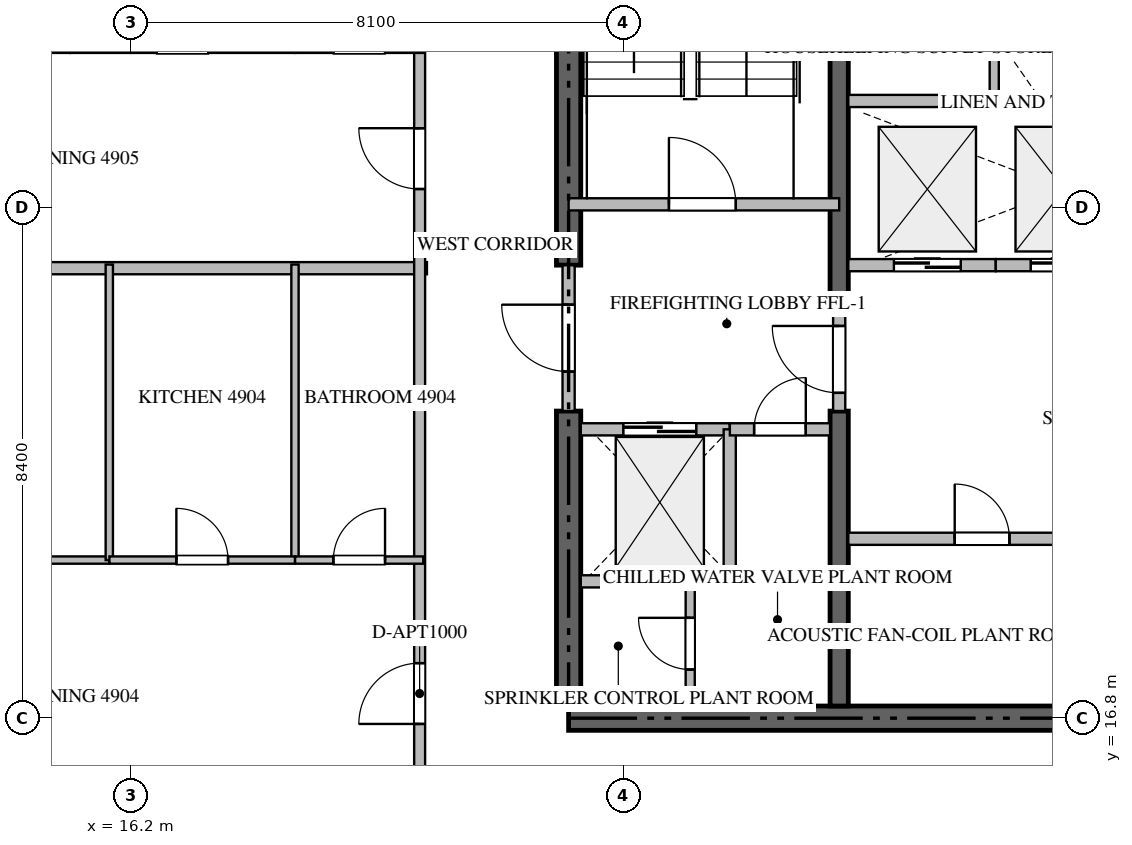
"""IFC4 building model, lengths in metres.
Left out: names, types, materials, properties, quantities, classifications, styles, units other than length and angle.
Written with IfcOpenShell. Run it as: python <this file> out.ifc"""

import sys

from ifc_helpers import new_model, si_unit, direction, frame, frame_2d, origin, place, context, subcontext, project, spatial, rectangle, extrude, source, transform, mapped, element, fill, save


model = new_model("IFC4")
c1 = context("Model", 3, precision=1e-05, world=origin(), true_north=direction((0.0, 1.0)))
c2 = subcontext(c1, "Body", "Model", "MODEL_VIEW")
j1 = project(units=[si_unit("LENGTHUNIT", "METRE"), si_unit("PLANEANGLEUNIT", "RADIAN")], contexts=[c1])
p1 = place(None, origin())
s1 = spatial("IfcSite", under=j1, at=p1, CompositionType="ELEMENT")
p2 = place(p1, origin())
s2 = spatial("IfcBuilding", under=s1, at=p2, CompositionType="ELEMENT")
p3 = place(p2, frame((0.0, 0.0, 195.15)))
s3 = spatial("IfcBuildingStorey", under=s2, at=p3, CompositionType="ELEMENT", Elevation=195.15)
p4 = place(p3, frame((23.4, 16.8, -0.26), z_axis=(0.0, 0.0, 1.0), x_axis=(1.0, 0.0, 0.0)))
e1 = element("IfcWall", 1, at=p4, inside=s3, PredefinedType="SHEAR", context=c2, shape_type="SweptSolid", body=[
    extrude(rectangle(XDim=18.0, YDim=0.4, at=frame_2d((9.0, 0.0))), origin(), (0.0, 0.0, 1.0), 3.568),
])
p5 = place(p3, frame((23.4, 17.0, -0.26), z_axis=(0.0, 0.0, 1.0), x_axis=(0.0, 1.0, 0.0)))
e2 = element("IfcWall", 2, at=p5, inside=s3, PredefinedType="SHEAR", context=c2, shape_type="SweptSolid", body=[
    extrude(rectangle(XDim=4.85, YDim=0.4, at=frame_2d((2.425, 0.0))), origin(), (0.0, 0.0, 1.0), 3.568),
])
p6 = place(p3, frame((23.4, 24.25, -0.26), z_axis=(0.0, 0.0, 1.0), x_axis=(0.0, 1.0, 0.0)))
e3 = element("IfcWall", 3, at=p6, inside=s3, PredefinedType="SHEAR", context=c2, shape_type="SweptSolid", body=[
    extrude(rectangle(XDim=9.15, YDim=0.4, at=frame_2d((4.575, 0.0))), origin(), (0.0, 0.0, 1.0), 3.568),
])
p7 = place(p3, frame((27.85, 17.0, -0.26), z_axis=(0.0, 0.0, 1.0), x_axis=(0.0, 1.0, 0.0)))
e4 = element("IfcWall", 4, at=p7, inside=s3, PredefinedType="SHEAR", context=c2, shape_type="SweptSolid", body=[
    extrude(rectangle(XDim=4.85, YDim=0.3, at=frame_2d((2.425, 0.0))), origin(), (0.0, 0.0, 1.0), 3.568),
])
p8 = place(p3, frame((27.85, 23.55, -0.26), z_axis=(0.0, 0.0, 1.0), x_axis=(0.0, 1.0, 0.0)))
e5 = element("IfcWall", 5, at=p8, inside=s3, PredefinedType="SHEAR", context=c2, shape_type="SweptSolid", body=[
    extrude(rectangle(XDim=9.85, YDim=0.3, at=frame_2d((4.925, 0.0))), origin(), (0.0, 0.0, 1.0), 3.568),
])
p9 = place(p3, frame((23.4, 25.25, 0.0), z_axis=(0.0, 0.0, 1.0), x_axis=(1.0, 0.0, 0.0)))
e6 = element("IfcWall", 6, at=p9, inside=s3, PredefinedType="STANDARD", context=c2, shape_type="SweptSolid", body=[
    extrude(rectangle(XDim=4.45, YDim=0.2, at=frame_2d((2.225, 0.0))), origin(), (0.0, 0.0, 1.0), 3.31),
])
p10 = place(p9, frame((1.65, 0.0, 0.0)))
e7 = element("IfcOpeningElement", 7, at=p10, cuts=e6, PredefinedType="OPENING", context=c2, shape_type="SweptSolid", body=[
    extrude(rectangle(XDim=1.1, YDim=2.15, at=frame_2d((0.55, 1.075))), frame((0.0, 0.11, 0.0), z_axis=(0.0, -1.0, 0.0), x_axis=(1.0, 0.0, 0.0)), (0.0, 0.0, 1.0), 0.22),
])
p11 = place(p3, frame((23.6, 21.55, 0.0), z_axis=(0.0, 0.0, 1.0), x_axis=(1.0, 0.0, 0.0)))
e8 = element("IfcWall", 8, at=p11, inside=s3, PredefinedType="STANDARD", context=c2, shape_type="SweptSolid", body=[
    extrude(rectangle(XDim=2.45, YDim=0.2, at=frame_2d((1.225, 0.0))), origin(), (0.0, 0.0, 1.0), 3.31),
])
p12 = place(p11, frame((0.7, 0.0, 0.0)))
e9 = element("IfcOpeningElement", 9, at=p12, cuts=e8, PredefinedType="OPENING", context=c2, shape_type="SweptSolid", body=[
    extrude(rectangle(XDim=1.2, YDim=2.2, at=frame_2d((0.6, 1.1))), frame((0.0, 0.11, 0.0), z_axis=(0.0, -1.0, 0.0), x_axis=(1.0, 0.0, 0.0)), (0.0, 0.0, 1.0), 0.22),
])
p13 = place(p3, frame((28.0, 24.25, 0.0), z_axis=(0.0, 0.0, 1.0), x_axis=(1.0, 0.0, 0.0)))
e10 = element("IfcWall", 10, at=p13, inside=s3, PredefinedType="STANDARD", context=c2, shape_type="SweptSolid", body=[
    extrude(rectangle(XDim=2.425, YDim=0.2, at=frame_2d((1.212, 0.0))), origin(), (0.0, 0.0, 1.0), 3.31),
])
p14 = place(p13, frame((0.75, 0.0, 0.0)))
e11 = element("IfcOpeningElement", 11, at=p14, cuts=e10, PredefinedType="OPENING", context=c2, shape_type="SweptSolid", body=[
    extrude(rectangle(XDim=1.1, YDim=2.2, at=frame_2d((0.55, 1.1))), frame((0.0, 0.11, 0.0), z_axis=(0.0, -1.0, 0.0), x_axis=(1.0, 0.0, 0.0)), (0.0, 0.0, 1.0), 0.22),
])
p15 = place(p3, frame((30.425, 24.25, 0.0), z_axis=(0.0, 0.0, 1.0), x_axis=(1.0, 0.0, 0.0)))
e12 = element("IfcWall", 12, at=p15, inside=s3, PredefinedType="STANDARD", context=c2, shape_type="SweptSolid", body=[
    extrude(rectangle(XDim=2.25, YDim=0.2, at=frame_2d((1.125, 0.0))), origin(), (0.0, 0.0, 1.0), 3.31),
])
p16 = place(p15, frame((0.575, 0.0, 0.0)))
e13 = element("IfcOpeningElement", 13, at=p16, cuts=e12, PredefinedType="OPENING", context=c2, shape_type="SweptSolid", body=[
    extrude(rectangle(XDim=1.1, YDim=2.2, at=frame_2d((0.55, 1.1))), frame((0.0, 0.11, 0.0), z_axis=(0.0, -1.0, 0.0), x_axis=(1.0, 0.0, 0.0)), (0.0, 0.0, 1.0), 0.22),
])
p17 = place(p3, frame((26.05, 19.05, 0.0), z_axis=(0.0, 0.0, 1.0), x_axis=(0.0, 1.0, 0.0)))
e14 = element("IfcWall", 14, at=p17, inside=s3, PredefinedType="STANDARD", context=c2, shape_type="SweptSolid", body=[
    extrude(rectangle(XDim=2.5, YDim=0.2, at=frame_2d((1.25, 0.0))), origin(), (0.0, 0.0, 1.0), 3.31),
])
p18 = place(p3, frame((23.6, 19.05, 0.0), z_axis=(0.0, 0.0, 1.0), x_axis=(1.0, 0.0, 0.0)))
e15 = element("IfcWall", 15, at=p18, inside=s3, PredefinedType="STANDARD", context=c2, shape_type="SweptSolid", body=[
    extrude(rectangle(XDim=2.45, YDim=0.2, at=frame_2d((1.225, 0.0))), origin(), (0.0, 0.0, 1.0), 3.31),
])
p19 = place(p3, frame((26.052, 21.55, 0.0), z_axis=(0.0, 0.0, 1.0), x_axis=(1.0, 0.0, 0.0)))
e16 = element("IfcWall", 16, at=p19, inside=s3, PredefinedType="STANDARD", context=c2, shape_type="SweptSolid", body=[
    extrude(rectangle(XDim=1.648, YDim=0.2, at=frame_2d((0.824, 0.0))), origin(), (0.0, 0.0, 1.0), 3.31),
])
p20 = place(p19, frame((0.399, 0.0, 0.0)))
e17 = element("IfcOpeningElement", 17, at=p20, cuts=e16, PredefinedType="OPENING", context=c2, shape_type="SweptSolid", body=[
    extrude(rectangle(XDim=0.85, YDim=2.1, at=frame_2d((0.425, 1.05))), frame((0.0, 0.11, 0.0), z_axis=(0.0, -1.0, 0.0), x_axis=(1.0, 0.0, 0.0)), (0.0, 0.0, 1.0), 0.22),
])
p21 = place(p3, frame((23.4, 21.852, 0.0), z_axis=(0.0, 0.0, 1.0), x_axis=(0.0, 1.0, 0.0)))
e18 = element("IfcWall", 18, at=p21, inside=s3, PredefinedType="STANDARD", context=c2, shape_type="SweptSolid", body=[
    extrude(rectangle(XDim=2.396, YDim=0.2, at=frame_2d((1.198, 0.0))), origin(), (0.0, 0.0, 1.0), 3.31),
])
p22 = place(p21, frame((0.648, 0.0, 0.0)))
e19 = element("IfcOpeningElement", 19, at=p22, cuts=e18, PredefinedType="OPENING", context=c2, shape_type="SweptSolid", body=[
    extrude(rectangle(XDim=1.1, YDim=2.15, at=frame_2d((0.55, 1.075))), frame((0.0, 0.11, 0.0), z_axis=(0.0, -1.0, 0.0), x_axis=(1.0, 0.0, 0.0)), (0.0, 0.0, 1.0), 0.22),
])
p23 = place(p3, frame((27.85, 21.852, 0.0), z_axis=(0.0, 0.0, 1.0), x_axis=(0.0, 1.0, 0.0)))
e20 = element("IfcWall", 20, at=p23, inside=s3, PredefinedType="STANDARD", context=c2, shape_type="SweptSolid", body=[
    extrude(rectangle(XDim=1.696, YDim=0.2, at=frame_2d((0.848, 0.0))), origin(), (0.0, 0.0, 1.0), 3.31),
])
p24 = place(p23, frame((0.298, 0.0, 0.0)))
e21 = element("IfcOpeningElement", 21, at=p24, cuts=e20, PredefinedType="OPENING", context=c2, shape_type="SweptSolid", body=[
    extrude(rectangle(XDim=1.1, YDim=2.15, at=frame_2d((0.55, 1.075))), frame((0.0, 0.11, 0.0), z_axis=(0.0, -1.0, 0.0), x_axis=(1.0, 0.0, 0.0)), (0.0, 0.0, 1.0), 0.22),
])
p25 = place(p3, frame((28.0, 26.95, 0.0), z_axis=(0.0, 0.0, 1.0), x_axis=(1.0, 0.0, 0.0)))
e22 = element("IfcWall", 22, at=p25, inside=s3, PredefinedType="STANDARD", context=c2, shape_type="SweptSolid", body=[
    extrude(rectangle(XDim=6.95, YDim=0.2, at=frame_2d((3.475, 0.0))), origin(), (0.0, 0.0, 1.0), 3.31),
])
p26 = place(p3, frame((25.4, 17.0, 0.0), z_axis=(0.0, 0.0, 1.0), x_axis=(0.0, 1.0, 0.0)))
e23 = element("IfcWall", 23, at=p26, inside=s3, PredefinedType="PARTITIONING", context=c2, shape_type="SweptSolid", body=[
    extrude(rectangle(XDim=2.05, YDim=0.15, at=frame_2d((1.025, 0.0))), origin(), (0.0, 0.0, 1.0), 3.31),
])
p27 = place(p26, frame((0.6, 0.0, 0.0)))
e24 = element("IfcOpeningElement", 24, at=p27, cuts=e23, PredefinedType="OPENING", context=c2, shape_type="SweptSolid", body=[
    extrude(rectangle(XDim=0.85, YDim=2.1, at=frame_2d((0.425, 1.05))), frame((0.0, 0.085, 0.0), z_axis=(0.0, -1.0, 0.0), x_axis=(1.0, 0.0, 0.0)), (0.0, 0.0, 1.0), 0.17),
])
p28 = place(p3, frame((30.4, 26.95, 0.0), z_axis=(0.0, 0.0, 1.0), x_axis=(0.0, 1.0, 0.0)))
e25 = element("IfcWall", 25, at=p28, inside=s3, PredefinedType="PARTITIONING", context=c2, shape_type="SweptSolid", body=[
    extrude(rectangle(XDim=3.6, YDim=0.15, at=frame_2d((1.8, 0.0))), origin(), (0.0, 0.0, 1.0), 3.31),
])
p29 = place(p28, frame((1.375, 0.0, 0.0)))
e26 = element("IfcOpeningElement", 26, at=p29, cuts=e25, PredefinedType="OPENING", context=c2, shape_type="SweptSolid", body=[
    extrude(rectangle(XDim=0.85, YDim=2.1, at=frame_2d((0.425, 1.05))), frame((0.0, 0.085, 0.0), z_axis=(0.0, -1.0, 0.0), x_axis=(1.0, 0.0, 0.0)), (0.0, 0.0, 1.0), 0.17),
])
p30 = place(p3, frame((28.0, 19.75, 0.0), z_axis=(0.0, 0.0, 1.0), x_axis=(1.0, 0.0, 0.0)))
e27 = element("IfcWall", 27, at=p30, inside=s3, PredefinedType="STANDARD", context=c2, shape_type="SweptSolid", body=[
    extrude(rectangle(XDim=4.4, YDim=0.2, at=frame_2d((2.2, 0.0))), origin(), (0.0, 0.0, 1.0), 3.31),
])
p31 = place(p30, frame((1.75, 0.0, 0.0)))
e28 = element("IfcOpeningElement", 28, at=p31, cuts=e27, PredefinedType="OPENING", context=c2, shape_type="SweptSolid", body=[
    extrude(rectangle(XDim=0.9, YDim=2.1, at=frame_2d((0.45, 1.05))), frame((0.0, 0.11, 0.0), z_axis=(0.0, -1.0, 0.0), x_axis=(1.0, 0.0, 0.0)), (0.0, 0.0, 1.0), 0.22),
])
p32 = place(p3, frame((7.882, 24.2, 0.0), z_axis=(0.0, 0.0, 1.0), x_axis=(1.0, 0.0, 0.0)))
e29 = element("IfcWall", 29, at=p32, inside=s3, PredefinedType="PARTITIONING", context=c2, shape_type="SweptSolid", body=[
    extrude(rectangle(XDim=13.188, YDim=0.2, at=frame_2d((6.594, 0.0))), origin(), (0.0, 0.0, 1.0), 3.31),
])
p33 = place(p3, frame((20.95, 14.9, 0.0), z_axis=(0.0, 0.0, 1.0), x_axis=(0.0, 1.0, 0.0)))
e30 = element("IfcWall", 30, at=p33, inside=s3, PredefinedType="PARTITIONING", context=c2, shape_type="SweptSolid", body=[
    extrude(rectangle(XDim=18.7, YDim=0.18, at=frame_2d((9.35, 0.0))), origin(), (0.0, 0.0, 1.0), 3.31),
])
p34 = place(p33, frame((1.805, 0.0, 0.0)))
e31 = element("IfcOpeningElement", 31, at=p34, cuts=e30, PredefinedType="OPENING", context=c2, shape_type="SweptSolid", body=[
    extrude(rectangle(XDim=1.0, YDim=2.15, at=frame_2d((0.5, 1.075))), frame((0.0, 0.1, 0.0), z_axis=(0.0, -1.0, 0.0), x_axis=(1.0, 0.0, 0.0)), (0.0, 0.0, 1.0), 0.2),
])
p35 = place(p33, frame((10.602, 0.0, 0.0)))
e32 = element("IfcOpeningElement", 32, at=p35, cuts=e30, PredefinedType="OPENING", context=c2, shape_type="SweptSolid", body=[
    extrude(rectangle(XDim=1.0, YDim=2.15, at=frame_2d((0.5, 1.075))), frame((0.0, 0.1, 0.0), z_axis=(0.0, -1.0, 0.0), x_axis=(1.0, 0.0, 0.0)), (0.0, 0.0, 1.0), 0.2),
])
p36 = place(p3, frame((7.895, 19.4, 0.0), z_axis=(0.0, 0.0, 1.0), x_axis=(1.0, 0.0, 0.0)))
e33 = element("IfcWall", 33, at=p36, inside=s3, PredefinedType="PARTITIONING", context=c2, shape_type="SweptSolid", body=[
    extrude(rectangle(XDim=7.951, YDim=0.12, at=frame_2d((3.976, 0.0))), origin(), (0.0, 0.0, 1.0), 3.31),
])
p37 = place(p36, frame((3.878, 0.0, 0.0)))
e34 = element("IfcOpeningElement", 34, at=p37, cuts=e33, PredefinedType="OPENING", context=c2, shape_type="SweptSolid", body=[
    extrude(rectangle(XDim=0.9, YDim=2.1, at=frame_2d((0.45, 1.05))), frame((0.0, 0.07, 0.0), z_axis=(0.0, -1.0, 0.0), x_axis=(1.0, 0.0, 0.0)), (0.0, 0.0, 1.0), 0.14),
])
for number, where, z_axis, x_axis in (
    (35, (15.846, 19.4, 0.0), (0.0, 0.0, 1.0), (0.0, 1.0, 0.0)),
    (36, (18.9, 19.4, 0.0), (0.0, 0.0, 1.0), (0.0, 1.0, 0.0)),
):
    element("IfcWall", number, at=place(p3, frame(where, z_axis=z_axis, x_axis=x_axis)), inside=s3, PredefinedType="PARTITIONING", context=c2, shape_type="SweptSolid", body=[
        extrude(rectangle(XDim=4.86, YDim=0.12, at=frame_2d((2.43, 0.0))), origin(), (0.0, 0.0, 1.0), 3.31),
    ])
p38 = place(p3, frame((15.848, 19.4, 0.0), z_axis=(0.0, 0.0, 1.0), x_axis=(1.0, 0.0, 0.0)))
e37 = element("IfcWall", 37, at=p38, inside=s3, PredefinedType="PARTITIONING", context=c2, shape_type="SweptSolid", body=[
    extrude(rectangle(XDim=3.052, YDim=0.12, at=frame_2d((1.526, 0.0))), origin(), (0.0, 0.0, 1.0), 3.31),
])
p39 = place(p38, frame((1.101, 0.0, 0.0)))
e38 = element("IfcOpeningElement", 38, at=p39, cuts=e37, PredefinedType="OPENING", context=c2, shape_type="SweptSolid", body=[
    extrude(rectangle(XDim=0.85, YDim=2.1, at=frame_2d((0.425, 1.05))), frame((0.0, 0.07, 0.0), z_axis=(0.0, -1.0, 0.0), x_axis=(1.0, 0.0, 0.0)), (0.0, 0.0, 1.0), 0.14),
])
p40 = place(p3, frame((18.902, 19.4, 0.0), z_axis=(0.0, 0.0, 1.0), x_axis=(1.0, 0.0, 0.0)))
e39 = element("IfcWall", 39, at=p40, inside=s3, PredefinedType="PARTITIONING", context=c2, shape_type="SweptSolid", body=[
    extrude(rectangle(XDim=2.108, YDim=0.12, at=frame_2d((1.054, 0.0))), origin(), (0.0, 0.0, 1.0), 3.31),
])
p41 = place(p40, frame((0.629, 0.0, 0.0)))
e40 = element("IfcOpeningElement", 40, at=p41, cuts=e39, PredefinedType="OPENING", context=c2, shape_type="SweptSolid", body=[
    extrude(rectangle(XDim=0.85, YDim=2.1, at=frame_2d((0.425, 1.05))), frame((0.0, 0.07, 0.0), z_axis=(0.0, -1.0, 0.0), x_axis=(1.0, 0.0, 0.0)), (0.0, 0.0, 1.0), 0.14),
])
p42 = place(p3, frame((7.895, 27.8, 0.0), z_axis=(0.0, 0.0, 1.0), x_axis=(1.0, 0.0, 0.0)))
e41 = element("IfcWall", 41, at=p42, inside=s3, PredefinedType="PARTITIONING", context=c2, shape_type="SweptSolid", body=[
    extrude(rectangle(XDim=7.303, YDim=0.12, at=frame_2d((3.651, 0.0))), origin(), (0.0, 0.0, 1.0), 3.31),
])
p43 = place(p42, frame((3.522, 0.0, 0.0)))
e42 = element("IfcOpeningElement", 42, at=p43, cuts=e41, PredefinedType="OPENING", context=c2, shape_type="SweptSolid", body=[
    extrude(rectangle(XDim=0.9, YDim=2.1, at=frame_2d((0.45, 1.05))), frame((0.0, 0.07, 0.0), z_axis=(0.0, -1.0, 0.0), x_axis=(1.0, 0.0, 0.0)), (0.0, 0.0, 1.0), 0.14),
])
p44 = place(p3, frame((15.2, 27.8, 0.0), z_axis=(0.0, 0.0, 1.0), x_axis=(1.0, 0.0, 0.0)))
e43 = element("IfcWall", 43, at=p44, inside=s3, PredefinedType="PARTITIONING", context=c2, shape_type="SweptSolid", body=[
    extrude(rectangle(XDim=3.7, YDim=0.12, at=frame_2d((1.85, 0.0))), origin(), (0.0, 0.0, 1.0), 3.31),
])
p45 = place(p44, frame((1.425, 0.0, 0.0)))
e44 = element("IfcOpeningElement", 44, at=p45, cuts=e43, PredefinedType="OPENING", context=c2, shape_type="SweptSolid", body=[
    extrude(rectangle(XDim=0.85, YDim=2.1, at=frame_2d((0.425, 1.05))), frame((0.0, 0.07, 0.0), z_axis=(0.0, -1.0, 0.0), x_axis=(1.0, 0.0, 0.0)), (0.0, 0.0, 1.0), 0.14),
])
p46 = place(p3, frame((18.902, 27.8, 0.0), z_axis=(0.0, 0.0, 1.0), x_axis=(1.0, 0.0, 0.0)))
e45 = element("IfcWall", 45, at=p46, inside=s3, PredefinedType="PARTITIONING", context=c2, shape_type="SweptSolid", body=[
    extrude(rectangle(XDim=2.108, YDim=0.12, at=frame_2d((1.054, 0.0))), origin(), (0.0, 0.0, 1.0), 3.31),
])
p47 = place(p46, frame((0.629, 0.0, 0.0)))
e46 = element("IfcOpeningElement", 46, at=p47, cuts=e45, PredefinedType="OPENING", context=c2, shape_type="SweptSolid", body=[
    extrude(rectangle(XDim=0.85, YDim=2.1, at=frame_2d((0.425, 1.05))), frame((0.0, 0.07, 0.0), z_axis=(0.0, -1.0, 0.0), x_axis=(1.0, 0.0, 0.0)), (0.0, 0.0, 1.0), 0.14),
])
m1 = source(origin(), c2, "Body", "SweptSolid", [
    extrude(rectangle(XDim=1.1, YDim=2.15, at=frame_2d((0.55, 1.075))), frame((0.0, 0.025, 0.0), z_axis=(0.0, -1.0, 0.0), x_axis=(1.0, 0.0, 0.0)), (0.0, 0.0, 1.0), 0.05),
])
p48 = place(p10, origin())
e47 = element("IfcDoor", 47, at=p48, inside=s3, OperationType="SINGLE_SWING_LEFT", PredefinedType="DOOR", context=c2, shape_type="MappedRepresentation", body=[
    mapped(m1, transform((0.0, 0.0, 0.0), scale=1.0)),
])
fill(e7, e47)
m2 = source(origin(), c2, "Body", "SweptSolid", [
    extrude(rectangle(XDim=1.2, YDim=2.2, at=frame_2d((0.6, 1.1))), frame((0.0, 0.025, 0.0), z_axis=(0.0, -1.0, 0.0), x_axis=(1.0, 0.0, 0.0)), (0.0, 0.0, 1.0), 0.05),
])
p49 = place(p12, origin())
e48 = element("IfcDoor", 48, at=p49, inside=s3, OperationType="DOUBLE_DOOR_SLIDING", PredefinedType="DOOR", context=c2, shape_type="MappedRepresentation", body=[
    mapped(m2, transform((0.0, 0.0, 0.0), scale=1.0)),
])
fill(e9, e48)
m3 = source(origin(), c2, "Body", "SweptSolid", [
    extrude(rectangle(XDim=1.1, YDim=2.2, at=frame_2d((0.55, 1.1))), frame((0.0, 0.025, 0.0), z_axis=(0.0, -1.0, 0.0), x_axis=(1.0, 0.0, 0.0)), (0.0, 0.0, 1.0), 0.05),
])
p50 = place(p14, origin())
e49 = element("IfcDoor", 49, at=p50, inside=s3, OperationType="DOUBLE_DOOR_SLIDING", PredefinedType="DOOR", context=c2, shape_type="MappedRepresentation", body=[
    mapped(m3, transform((0.0, 0.0, 0.0), scale=1.0)),
])
fill(e11, e49)
p51 = place(p16, origin())
e50 = element("IfcDoor", 50, at=p51, inside=s3, OperationType="DOUBLE_DOOR_SLIDING", PredefinedType="DOOR", context=c2, shape_type="MappedRepresentation", body=[
    mapped(m3, transform((0.0, 0.0, 0.0), scale=1.0)),
])
fill(e13, e50)
m4 = source(origin(), c2, "Body", "SweptSolid", [
    extrude(rectangle(XDim=0.85, YDim=2.1, at=frame_2d((0.425, 1.05))), frame((0.0, 0.025, 0.0), z_axis=(0.0, -1.0, 0.0), x_axis=(1.0, 0.0, 0.0)), (0.0, 0.0, 1.0), 0.05),
])
p52 = place(p20, origin())
e51 = element("IfcDoor", 51, at=p52, inside=s3, OperationType="SINGLE_SWING_RIGHT", PredefinedType="DOOR", context=c2, shape_type="MappedRepresentation", body=[
    mapped(m4, transform((0.0, 0.0, 0.0), scale=1.0)),
])
fill(e17, e51)
p53 = place(p22, origin())
e52 = element("IfcDoor", 52, at=p53, inside=s3, OperationType="SINGLE_SWING_RIGHT", PredefinedType="DOOR", context=c2, shape_type="MappedRepresentation", body=[
    mapped(m1, transform((0.0, 0.0, 0.0), scale=1.0)),
])
fill(e19, e52)
p54 = place(p24, origin())
e53 = element("IfcDoor", 53, at=p54, inside=s3, OperationType="SINGLE_SWING_RIGHT", PredefinedType="DOOR", context=c2, shape_type="MappedRepresentation", body=[
    mapped(m1, transform((0.0, 0.0, 0.0), scale=1.0)),
])
fill(e21, e53)
p55 = place(p27, origin())
e54 = element("IfcDoor", 54, at=p55, inside=s3, OperationType="SINGLE_SWING_RIGHT", PredefinedType="DOOR", context=c2, shape_type="MappedRepresentation", body=[
    mapped(m4, transform((0.0, 0.0, 0.0), scale=1.0)),
])
fill(e24, e54)
m5 = source(origin(), c2, "Body", "SweptSolid", [
    extrude(rectangle(XDim=0.9, YDim=2.1, at=frame_2d((0.45, 1.05))), frame((0.0, 0.025, 0.0), z_axis=(0.0, -1.0, 0.0), x_axis=(1.0, 0.0, 0.0)), (0.0, 0.0, 1.0), 0.05),
])
p56 = place(p31, origin())
e55 = element("IfcDoor", 55, at=p56, inside=s3, OperationType="SINGLE_SWING_LEFT", PredefinedType="DOOR", context=c2, shape_type="MappedRepresentation", body=[
    mapped(m5, transform((0.0, 0.0, 0.0), scale=1.0)),
])
fill(e28, e55)
m6 = source(origin(), c2, "Body", "SweptSolid", [
    extrude(rectangle(XDim=1.0, YDim=2.15, at=frame_2d((0.5, 1.075))), frame((0.0, 0.025, 0.0), z_axis=(0.0, -1.0, 0.0), x_axis=(1.0, 0.0, 0.0)), (0.0, 0.0, 1.0), 0.05),
])
p57 = place(p34, origin())
e56 = element("IfcDoor", 56, at=p57, inside=s3, OperationType="SINGLE_SWING_LEFT", PredefinedType="DOOR", context=c2, shape_type="MappedRepresentation", body=[
    mapped(m6, transform((0.0, 0.0, 0.0), scale=1.0)),
])
fill(e31, e56)
p58 = place(p35, origin())
e57 = element("IfcDoor", 57, at=p58, inside=s3, OperationType="SINGLE_SWING_RIGHT", PredefinedType="DOOR", context=c2, shape_type="MappedRepresentation", body=[
    mapped(m6, transform((0.0, 0.0, 0.0), scale=1.0)),
])
fill(e32, e57)
p59 = place(p39, origin())
e58 = element("IfcDoor", 58, at=p59, inside=s3, OperationType="SINGLE_SWING_LEFT", PredefinedType="DOOR", context=c2, shape_type="MappedRepresentation", body=[
    mapped(m4, transform((0.0, 0.0, 0.0), scale=1.0)),
])
fill(e38, e58)
p60 = place(p41, origin())
e59 = element("IfcDoor", 59, at=p60, inside=s3, OperationType="SINGLE_SWING_RIGHT", PredefinedType="DOOR", context=c2, shape_type="MappedRepresentation", body=[
    mapped(m4, transform((0.0, 0.0, 0.0), scale=1.0)),
])
fill(e40, e59)
save(model, sys.argv[1])
